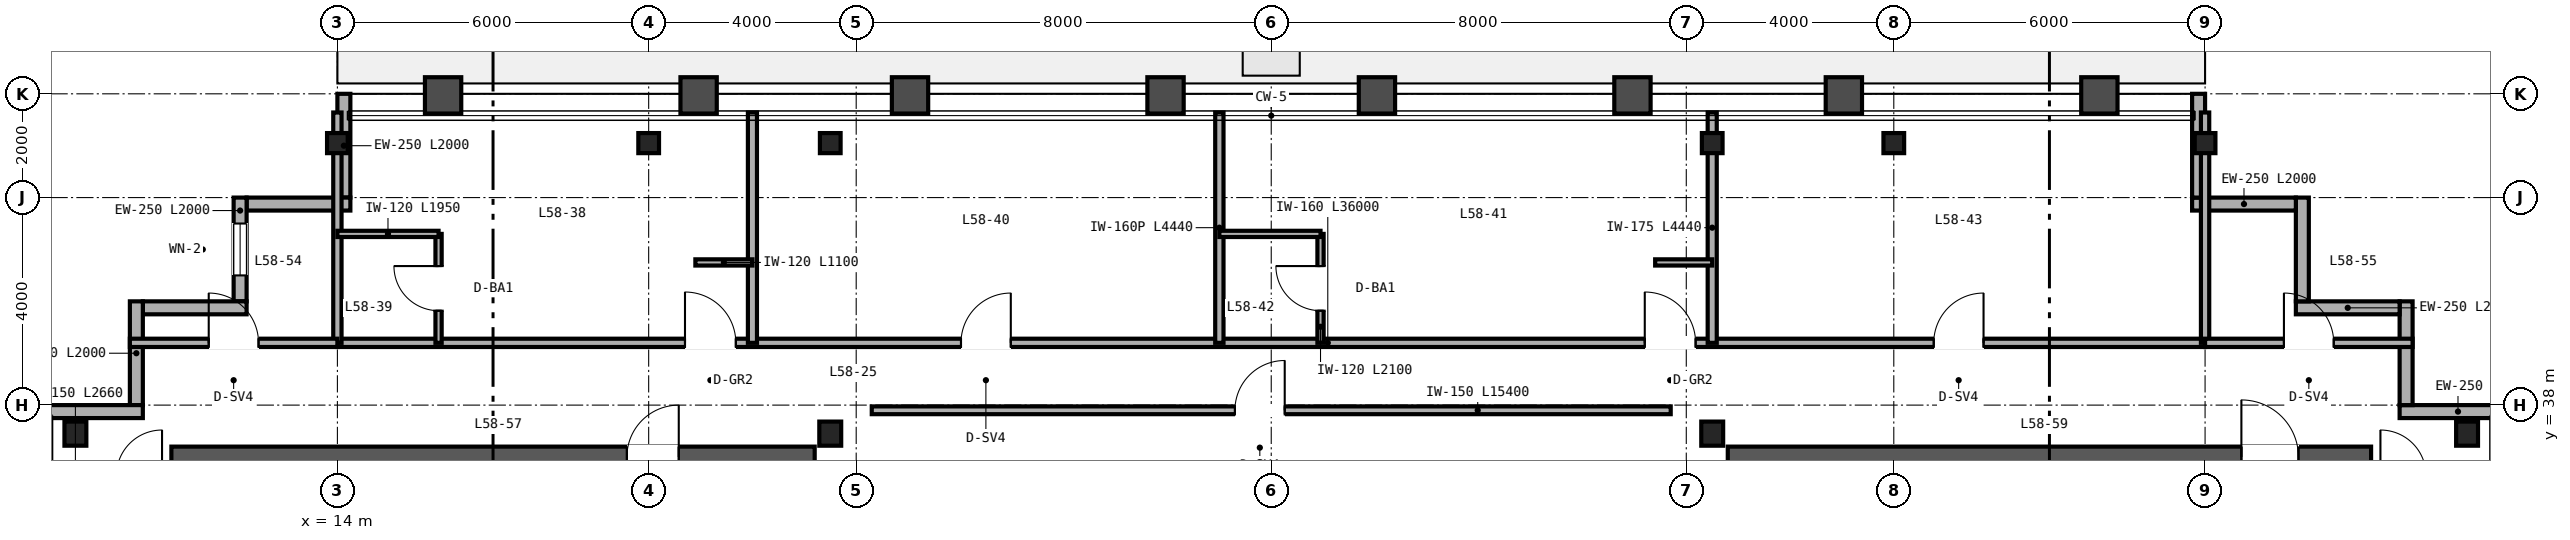
"""IFC4 building model, lengths in metres.
Left out: names, types, materials, properties, quantities, classifications, styles, units other than length and angle.
Written with IfcOpenShell. Run it as: python <this file> out.ifc"""

import sys

from ifc_helpers import new_model, si_unit, direction, frame, frame_2d, origin, origin_2d, place, context, subcontext, project, spatial, rectangle, i_section, extrude, source, transform, mapped, element, fill, save


model = new_model("IFC4")
c1 = context("Model", 3, precision=1e-05, world=origin(), true_north=direction((0.0, 1.0)))
c2 = subcontext(c1, "Body", "Model", "MODEL_VIEW")
j1 = project(units=[si_unit("LENGTHUNIT", "METRE"), si_unit("PLANEANGLEUNIT", "RADIAN")], contexts=[c1])
p1 = place(None, origin())
s1 = spatial("IfcSite", under=j1, at=p1, CompositionType="ELEMENT")
p2 = place(p1, origin())
s2 = spatial("IfcBuilding", under=s1, at=p2, CompositionType="ELEMENT")
p3 = place(p2, frame((0.0, 0.0, 232.8)))
s3 = spatial("IfcBuildingStorey", under=s2, at=p3, CompositionType="ELEMENT", Elevation=232.8)
p4 = place(p3, frame((10.8, 37.0, 0.0), z_axis=(0.0, 0.0, 1.0), x_axis=(1.0, 0.0, 0.0)))
e1 = element("IfcWall", 1, at=p4, inside=s3, PredefinedType="SHEAR", context=c2, shape_type="SweptSolid", body=[
    extrude(rectangle(XDim=12.4, YDim=0.4, at=frame_2d((6.2, 0.0))), origin(), (0.0, 0.0, 1.0), 3.38),
])
p5 = place(p4, frame((8.78, 0.0, 0.0)))
e2 = element("IfcOpeningElement", 2, at=p5, cuts=e1, PredefinedType="OPENING", context=c2, shape_type="SweptSolid", body=[
    extrude(rectangle(XDim=1.0, YDim=2.15, at=frame_2d((0.5, 1.075))), frame((0.0, 0.21, 0.0), z_axis=(0.0, -1.0, 0.0), x_axis=(1.0, 0.0, 0.0)), (0.0, 0.0, 1.0), 0.42),
])
p6 = place(p3, frame((40.8, 37.0, 0.0), z_axis=(0.0, 0.0, 1.0), x_axis=(1.0, 0.0, 0.0)))
e3 = element("IfcWall", 3, at=p6, inside=s3, PredefinedType="SHEAR", context=c2, shape_type="SweptSolid", body=[
    extrude(rectangle(XDim=12.4, YDim=0.4, at=frame_2d((6.2, 0.0))), origin(), (0.0, 0.0, 1.0), 3.38),
])
p7 = place(p6, frame((9.9, 0.0, 0.0)))
e4 = element("IfcOpeningElement", 4, at=p7, cuts=e3, PredefinedType="OPENING", context=c2, shape_type="SweptSolid", body=[
    extrude(rectangle(XDim=1.1, YDim=2.15, at=frame_2d((0.55, 1.075))), frame((0.0, 0.21, 0.0), z_axis=(0.0, -1.0, 0.0), x_axis=(1.0, 0.0, 0.0)), (0.0, 0.0, 1.0), 0.42),
])
m1 = source(origin(), c2, "Body", "SweptSolid", [
    extrude(i_section(OverallWidth=0.422, OverallDepth=0.465, WebThickness=0.045, FlangeThickness=0.073, FilletRadius=0.025, at=origin_2d()), origin(), (0.0, 0.0, 1.0), 3.38),
])
for number, where, z_axis, x_axis in (
    (5, (8.95, 37.45, 0.0), (0.0, 0.0, 1.0), (1.0, 0.0, 0.0)),
    (6, (23.5, 37.45, 0.0), (0.0, 0.0, 1.0), (1.0, 0.0, 0.0)),
    (7, (40.5, 37.45, 0.0), (0.0, 0.0, 1.0), (1.0, 0.0, 0.0)),
    (8, (55.05, 37.45, 0.0), (0.0, 0.0, 1.0), (1.0, 0.0, 0.0)),
):
    element("IfcColumn", number, at=place(p3, frame(where, z_axis=z_axis, x_axis=x_axis)), inside=s3, PredefinedType="COLUMN", context=c2, shape_type="MappedRepresentation", body=[
        mapped(m1, transform((0.0, 0.0, 0.0), scale=1.0)),
    ])
m2 = source(origin(), c2, "Body", "SweptSolid", [
    extrude(i_section(OverallWidth=0.399, OverallDepth=0.387, WebThickness=0.021, FlangeThickness=0.033, FilletRadius=0.025, at=origin_2d()), origin(), (0.0, 0.0, 1.0), 3.38),
])
for number, where, z_axis, x_axis in (
    (9, (14.0, 43.05, 0.0), (0.0, 0.0, 1.0), (1.0, 0.0, 0.0)),
    (10, (20.0, 43.05, 0.0), (0.0, 0.0, 1.0), (1.0, 0.0, 0.0)),
    (11, (23.5, 43.05, 0.0), (0.0, 0.0, 1.0), (1.0, 0.0, 0.0)),
    (12, (40.5, 43.05, 0.0), (0.0, 0.0, 1.0), (1.0, 0.0, 0.0)),
    (13, (44.0, 43.05, 0.0), (0.0, 0.0, 1.0), (1.0, 0.0, 0.0)),
    (14, (50.0, 43.05, 0.0), (0.0, 0.0, 1.0), (1.0, 0.0, 0.0)),
):
    element("IfcColumn", number, at=place(p3, frame(where, z_axis=z_axis, x_axis=x_axis)), inside=s3, PredefinedType="COLUMN", context=c2, shape_type="MappedRepresentation", body=[
        mapped(m2, transform((0.0, 0.0, 0.0), scale=1.0)),
    ])
p8 = place(p3, frame((56.0, 37.875, 0.0), z_axis=(0.0, 0.0, 1.0), x_axis=(-1.0, 0.0, 0.0)))
e15 = element("IfcWall", 15, at=p8, inside=s3, PredefinedType="SOLIDWALL", context=c2, shape_type="SweptSolid", body=[
    extrude(rectangle(XDim=2.25, YDim=0.25, at=frame_2d((1.125, 0.0))), origin(), (0.0, 0.0, 1.0), 3.38),
])
for number, where, z_axis, x_axis in (
    (16, (53.875, 38.0, 0.0), (0.0, 0.0, 1.0), (0.0, 1.0, 0.0)),
    (17, (53.75, 39.875, 0.0), (0.0, 0.0, 1.0), (-1.0, 0.0, 0.0)),
    (18, (51.875, 40.0, 0.0), (0.0, 0.0, 1.0), (0.0, 1.0, 0.0)),
    (19, (51.75, 41.875, 0.0), (0.0, 0.0, 1.0), (-1.0, 0.0, 0.0)),
):
    element("IfcWall", number, at=place(p3, frame(where, z_axis=z_axis, x_axis=x_axis)), inside=s3, PredefinedType="SOLIDWALL", context=c2, shape_type="SweptSolid", body=[
        extrude(rectangle(XDim=2.0, YDim=0.25, at=frame_2d((1.0, 0.0))), origin(), (0.0, 0.0, 1.0), 3.38),
    ])
for number, where, z_axis, x_axis in (
    (20, (49.875, 42.0, 0.0), (0.0, 0.0, 1.0), (0.0, 1.0, 0.0)),
    (21, (14.125, 44.0, 0.0), (0.0, 0.0, 1.0), (0.0, -1.0, 0.0)),
):
    element("IfcWall", number, at=place(p3, frame(where, z_axis=z_axis, x_axis=x_axis)), inside=s3, PredefinedType="SOLIDWALL", context=c2, shape_type="SweptSolid", body=[
        extrude(rectangle(XDim=2.0, YDim=0.25, at=frame_2d((1.0, 0.0))), origin(), (0.0, 0.0, 1.0), 2.687),
    ])
p9 = place(p3, frame((14.25, 41.875, 0.0), z_axis=(0.0, 0.0, 1.0), x_axis=(-1.0, 0.0, 0.0)))
e22 = element("IfcWall", 22, at=p9, inside=s3, PredefinedType="SOLIDWALL", context=c2, shape_type="SweptSolid", body=[
    extrude(rectangle(XDim=2.0, YDim=0.25, at=frame_2d((1.0, 0.0))), origin(), (0.0, 0.0, 1.0), 3.38),
])
p10 = place(p3, frame((12.125, 42.0, 0.0), z_axis=(0.0, 0.0, 1.0), x_axis=(0.0, -1.0, 0.0)))
e23 = element("IfcWall", 23, at=p10, inside=s3, PredefinedType="SOLIDWALL", context=c2, shape_type="SweptSolid", body=[
    extrude(rectangle(XDim=2.0, YDim=0.25, at=frame_2d((1.0, 0.0))), origin(), (0.0, 0.0, 1.0), 3.38),
])
p11 = place(p10, frame((0.5, 0.0, 0.85)))
e24 = element("IfcOpeningElement", 24, at=p11, cuts=e23, PredefinedType="OPENING", context=c2, shape_type="SweptSolid", body=[
    extrude(rectangle(XDim=1.0, YDim=1.9, at=frame_2d((0.5, 0.95))), frame((0.0, 0.135, 0.0), z_axis=(0.0, -1.0, 0.0), x_axis=(1.0, 0.0, 0.0)), (0.0, 0.0, 1.0), 0.27),
])
for number, where, z_axis, x_axis in (
    (25, (12.25, 39.875, 0.0), (0.0, 0.0, 1.0), (-1.0, 0.0, 0.0)),
    (26, (10.125, 40.0, 0.0), (0.0, 0.0, 1.0), (0.0, -1.0, 0.0)),
):
    element("IfcWall", number, at=place(p3, frame(where, z_axis=z_axis, x_axis=x_axis)), inside=s3, PredefinedType="SOLIDWALL", context=c2, shape_type="SweptSolid", body=[
        extrude(rectangle(XDim=2.0, YDim=0.25, at=frame_2d((1.0, 0.0))), origin(), (0.0, 0.0, 1.0), 3.38),
    ])
p12 = place(p3, frame((10.25, 37.875, 0.0), z_axis=(0.0, 0.0, 1.0), x_axis=(-1.0, 0.0, 0.0)))
e27 = element("IfcWall", 27, at=p12, inside=s3, PredefinedType="SOLIDWALL", context=c2, shape_type="SweptSolid", body=[
    extrude(rectangle(XDim=2.25, YDim=0.25, at=frame_2d((1.125, 0.0))), origin(), (0.0, 0.0, 1.0), 3.38),
])
p13 = place(p3, frame((24.3, 37.9, 0.0), z_axis=(0.0, 0.0, 1.0), x_axis=(1.0, 0.0, 0.0)))
e28 = element("IfcWall", 28, at=p13, inside=s3, PredefinedType="PARTITIONING", context=c2, shape_type="SweptSolid", body=[
    extrude(rectangle(XDim=15.4, YDim=0.15, at=frame_2d((7.7, 0.0))), origin(), (0.0, 0.0, 1.0), 3.38),
])
p14 = place(p13, frame((7.0, 0.0, 0.0)))
e29 = element("IfcOpeningElement", 29, at=p14, cuts=e28, PredefinedType="OPENING", context=c2, shape_type="SweptSolid", body=[
    extrude(rectangle(XDim=0.96, YDim=2.15, at=frame_2d((0.48, 1.075))), frame((0.0, 0.085, 0.0), z_axis=(0.0, -1.0, 0.0), x_axis=(1.0, 0.0, 0.0)), (0.0, 0.0, 1.0), 0.17),
])
p15 = place(p3, frame((14.0, 39.2, 0.0), z_axis=(0.0, 0.0, 1.0), x_axis=(1.0, 0.0, 0.0)))
e30 = element("IfcWall", 30, at=p15, inside=s3, PredefinedType="PARTITIONING", context=c2, shape_type="SweptSolid", body=[
    extrude(rectangle(XDim=36.0, YDim=0.16, at=frame_2d((18.0, 0.0))), origin(), (0.0, 0.0, 1.0), 2.923),
])
p16 = place(p15, frame((6.7, 0.0, 0.0)))
e31 = element("IfcOpeningElement", 31, at=p16, cuts=e30, PredefinedType="OPENING", context=c2, shape_type="SweptSolid", body=[
    extrude(rectangle(XDim=0.98, YDim=2.2, at=frame_2d((0.49, 1.1))), frame((0.0, 0.09, 0.0), z_axis=(0.0, -1.0, 0.0), x_axis=(1.0, 0.0, 0.0)), (0.0, 0.0, 1.0), 0.18),
])
p17 = place(p15, frame((12.02, 0.0, 0.0)))
e32 = element("IfcOpeningElement", 32, at=p17, cuts=e30, PredefinedType="OPENING", context=c2, shape_type="SweptSolid", body=[
    extrude(rectangle(XDim=0.96, YDim=2.15, at=frame_2d((0.48, 1.075))), frame((0.0, 0.09, 0.0), z_axis=(0.0, -1.0, 0.0), x_axis=(1.0, 0.0, 0.0)), (0.0, 0.0, 1.0), 0.18),
])
p18 = place(p15, frame((25.2, 0.0, 0.0)))
e33 = element("IfcOpeningElement", 33, at=p18, cuts=e30, PredefinedType="OPENING", context=c2, shape_type="SweptSolid", body=[
    extrude(rectangle(XDim=0.98, YDim=2.2, at=frame_2d((0.49, 1.1))), frame((0.0, 0.09, 0.0), z_axis=(0.0, -1.0, 0.0), x_axis=(1.0, 0.0, 0.0)), (0.0, 0.0, 1.0), 0.18),
])
p19 = place(p15, frame((30.77, 0.0, 0.0)))
e34 = element("IfcOpeningElement", 34, at=p19, cuts=e30, PredefinedType="OPENING", context=c2, shape_type="SweptSolid", body=[
    extrude(rectangle(XDim=0.96, YDim=2.15, at=frame_2d((0.48, 1.075))), frame((0.0, 0.09, 0.0), z_axis=(0.0, -1.0, 0.0), x_axis=(1.0, 0.0, 0.0)), (0.0, 0.0, 1.0), 0.18),
])
for number, where, z_axis, x_axis in (
    (35, (14.0, 39.2, 0.0), (0.0, 0.0, 1.0), (0.0, 1.0, 0.0)),
    (36, (50.0, 39.2, 0.0), (0.0, 0.0, 1.0), (0.0, 1.0, 0.0)),
):
    element("IfcWall", number, at=place(p3, frame(where, z_axis=z_axis, x_axis=x_axis)), inside=s3, PredefinedType="PARTITIONING", context=c2, shape_type="SweptSolid", body=[
        extrude(rectangle(XDim=4.44, YDim=0.16, at=frame_2d((2.22, 0.0))), origin(), (0.0, 0.0, 1.0), 2.687),
    ])
p20 = place(p3, frame((22.0, 39.2, 0.0), z_axis=(0.0, 0.0, 1.0), x_axis=(0.0, 1.0, 0.0)))
e37 = element("IfcWall", 37, at=p20, inside=s3, PredefinedType="PARTITIONING", context=c2, shape_type="SweptSolid", body=[
    extrude(rectangle(XDim=4.44, YDim=0.175, at=frame_2d((2.22, 0.0))), origin(), (0.0, 0.0, 1.0), 2.843),
])
p21 = place(p3, frame((15.95, 39.2, 0.0), z_axis=(0.0, 0.0, 1.0), x_axis=(0.0, 1.0, 0.0)))
e38 = element("IfcWall", 38, at=p21, inside=s3, PredefinedType="PARTITIONING", context=c2, shape_type="SweptSolid", body=[
    extrude(rectangle(XDim=2.1, YDim=0.12, at=frame_2d((1.05, 0.0))), origin(), (0.0, 0.0, 1.0), 3.38),
])
p22 = place(p21, frame((0.62, 0.0, 0.0)))
e39 = element("IfcOpeningElement", 39, at=p22, cuts=e38, PredefinedType="OPENING", context=c2, shape_type="SweptSolid", body=[
    extrude(rectangle(XDim=0.86, YDim=2.1, at=frame_2d((0.43, 1.05))), frame((0.0, 0.07, 0.0), z_axis=(0.0, -1.0, 0.0), x_axis=(1.0, 0.0, 0.0)), (0.0, 0.0, 1.0), 0.14),
])
p23 = place(p3, frame((14.0, 41.3, 0.0), z_axis=(0.0, 0.0, 1.0), x_axis=(1.0, 0.0, 0.0)))
e40 = element("IfcWall", 40, at=p23, inside=s3, PredefinedType="PARTITIONING", context=c2, shape_type="SweptSolid", body=[
    extrude(rectangle(XDim=1.95, YDim=0.12, at=frame_2d((0.975, 0.0))), origin(), (0.0, 0.0, 1.0), 3.38),
])
p24 = place(p3, frame((20.9, 40.75, 0.0), z_axis=(0.0, 0.0, 1.0), x_axis=(1.0, 0.0, 0.0)))
e41 = element("IfcWall", 41, at=p24, inside=s3, PredefinedType="PARTITIONING", context=c2, shape_type="SweptSolid", body=[
    extrude(rectangle(XDim=1.1, YDim=0.12, at=frame_2d((0.55, 0.0))), origin(), (0.0, 0.0, 1.0), 3.38),
])
p25 = place(p3, frame((31.0, 39.2, 0.0), z_axis=(0.0, 0.0, 1.0), x_axis=(0.0, 1.0, 0.0)))
e42 = element("IfcWall", 42, at=p25, inside=s3, PredefinedType="PARTITIONING", context=c2, shape_type="SweptSolid", body=[
    extrude(rectangle(XDim=4.44, YDim=0.16, at=frame_2d((2.22, 0.0))), origin(), (0.0, 0.0, 1.0), 2.453),
])
p26 = place(p3, frame((40.5, 39.2, 0.0), z_axis=(0.0, 0.0, 1.0), x_axis=(0.0, 1.0, 0.0)))
e43 = element("IfcWall", 43, at=p26, inside=s3, PredefinedType="PARTITIONING", context=c2, shape_type="SweptSolid", body=[
    extrude(rectangle(XDim=4.44, YDim=0.175, at=frame_2d((2.22, 0.0))), origin(), (0.0, 0.0, 1.0), 2.453),
])
p27 = place(p3, frame((32.95, 39.2, 0.0), z_axis=(0.0, 0.0, 1.0), x_axis=(0.0, 1.0, 0.0)))
e44 = element("IfcWall", 44, at=p27, inside=s3, PredefinedType="PARTITIONING", context=c2, shape_type="SweptSolid", body=[
    extrude(rectangle(XDim=2.1, YDim=0.12, at=frame_2d((1.05, 0.0))), origin(), (0.0, 0.0, 1.0), 3.38),
])
p28 = place(p27, frame((0.62, 0.0, 0.0)))
e45 = element("IfcOpeningElement", 45, at=p28, cuts=e44, PredefinedType="OPENING", context=c2, shape_type="SweptSolid", body=[
    extrude(rectangle(XDim=0.86, YDim=2.1, at=frame_2d((0.43, 1.05))), frame((0.0, 0.07, 0.0), z_axis=(0.0, -1.0, 0.0), x_axis=(1.0, 0.0, 0.0)), (0.0, 0.0, 1.0), 0.14),
])
p29 = place(p3, frame((31.0, 41.3, 0.0), z_axis=(0.0, 0.0, 1.0), x_axis=(1.0, 0.0, 0.0)))
e46 = element("IfcWall", 46, at=p29, inside=s3, PredefinedType="PARTITIONING", context=c2, shape_type="SweptSolid", body=[
    extrude(rectangle(XDim=1.95, YDim=0.12, at=frame_2d((0.975, 0.0))), origin(), (0.0, 0.0, 1.0), 3.38),
])
p30 = place(p3, frame((39.4, 40.75, 0.0), z_axis=(0.0, 0.0, 1.0), x_axis=(1.0, 0.0, 0.0)))
e47 = element("IfcWall", 47, at=p30, inside=s3, PredefinedType="PARTITIONING", context=c2, shape_type="SweptSolid", body=[
    extrude(rectangle(XDim=1.1, YDim=0.12, at=frame_2d((0.55, 0.0))), origin(), (0.0, 0.0, 1.0), 2.923),
])
p31 = place(p3, frame((10.0, 39.2, 0.0), z_axis=(0.0, 0.0, 1.0), x_axis=(1.0, 0.0, 0.0)))
e48 = element("IfcWall", 48, at=p31, inside=s3, PredefinedType="PARTITIONING", context=c2, shape_type="SweptSolid", body=[
    extrude(rectangle(XDim=4.0, YDim=0.16, at=frame_2d((2.0, 0.0))), origin(), (0.0, 0.0, 1.0), 3.38),
])
p32 = place(p31, frame((1.52, 0.0, 0.0)))
e49 = element("IfcOpeningElement", 49, at=p32, cuts=e48, PredefinedType="OPENING", context=c2, shape_type="SweptSolid", body=[
    extrude(rectangle(XDim=0.96, YDim=2.15, at=frame_2d((0.48, 1.075))), frame((0.0, 0.09, 0.0), z_axis=(0.0, -1.0, 0.0), x_axis=(1.0, 0.0, 0.0)), (0.0, 0.0, 1.0), 0.18),
])
p33 = place(p3, frame((50.0, 39.2, 0.0), z_axis=(0.0, 0.0, 1.0), x_axis=(1.0, 0.0, 0.0)))
e50 = element("IfcWall", 50, at=p33, inside=s3, PredefinedType="PARTITIONING", context=c2, shape_type="SweptSolid", body=[
    extrude(rectangle(XDim=4.0, YDim=0.16, at=frame_2d((2.0, 0.0))), origin(), (0.0, 0.0, 1.0), 3.38),
])
p34 = place(p33, frame((1.52, 0.0, 0.0)))
e51 = element("IfcOpeningElement", 51, at=p34, cuts=e50, PredefinedType="OPENING", context=c2, shape_type="SweptSolid", body=[
    extrude(rectangle(XDim=0.96, YDim=2.15, at=frame_2d((0.48, 1.075))), frame((0.0, 0.09, 0.0), z_axis=(0.0, -1.0, 0.0), x_axis=(1.0, 0.0, 0.0)), (0.0, 0.0, 1.0), 0.18),
])
m3 = source(origin(), c2, "Body", "SweptSolid", [
    extrude(rectangle(XDim=1.0, YDim=1.9, at=frame_2d((0.5, 0.95))), frame((0.0, 0.03, 0.0), z_axis=(0.0, -1.0, 0.0), x_axis=(1.0, 0.0, 0.0)), (0.0, 0.0, 1.0), 0.06),
])
p35 = place(p11, origin())
e52 = element("IfcWindow", 52, at=p35, inside=s3, PartitioningType="SINGLE_PANEL", PredefinedType="WINDOW", context=c2, shape_type="MappedRepresentation", body=[
    mapped(m3, transform((0.0, 0.0, 0.0), scale=1.0)),
])
fill(e24, e52)
p36 = place(p3, frame((0.0, 0.0, -0.22)))
p37 = place(p36, frame((32.0, 44.9, 0.0)))
p38 = place(p37, frame((0.0, 0.0, 0.17)))
e53 = element("IfcDoor", 53, at=p38, inside=s3, OperationType="SINGLE_SWING_LEFT", PredefinedType="TRAPDOOR", context=c2, shape_type="SweptSolid", body=[
    extrude(rectangle(XDim=1.1, YDim=1.1, at=origin_2d()), origin(), (0.0, 0.0, 1.0), 0.05),
])
m4 = source(origin(), c2, "Body", "SweptSolid", [
    extrude(rectangle(XDim=1.0, YDim=2.15, at=frame_2d((0.5, 1.075))), frame((0.0, 0.025, 0.0), z_axis=(0.0, -1.0, 0.0), x_axis=(1.0, 0.0, 0.0)), (0.0, 0.0, 1.0), 0.05),
])
p39 = place(p5, origin())
e54 = element("IfcDoor", 54, at=p39, inside=s3, OperationType="SINGLE_SWING_RIGHT", PredefinedType="DOOR", context=c2, shape_type="MappedRepresentation", body=[
    mapped(m4, transform((0.0, 0.0, 0.0), scale=1.0)),
])
fill(e2, e54)
m5 = source(origin(), c2, "Body", "SweptSolid", [
    extrude(rectangle(XDim=1.1, YDim=2.15, at=frame_2d((0.55, 1.075))), frame((0.0, 0.025, 0.0), z_axis=(0.0, -1.0, 0.0), x_axis=(1.0, 0.0, 0.0)), (0.0, 0.0, 1.0), 0.05),
])
p40 = place(p7, origin())
e55 = element("IfcDoor", 55, at=p40, inside=s3, OperationType="SINGLE_SWING_LEFT", PredefinedType="DOOR", context=c2, shape_type="MappedRepresentation", body=[
    mapped(m5, transform((0.0, 0.0, 0.0), scale=1.0)),
])
fill(e4, e55)
m6 = source(origin(), c2, "Body", "SweptSolid", [
    extrude(rectangle(XDim=0.96, YDim=2.15, at=frame_2d((0.48, 1.075))), frame((0.0, 0.025, 0.0), z_axis=(0.0, -1.0, 0.0), x_axis=(1.0, 0.0, 0.0)), (0.0, 0.0, 1.0), 0.05),
])
p41 = place(p14, origin())
e56 = element("IfcDoor", 56, at=p41, inside=s3, OperationType="SINGLE_SWING_RIGHT", PredefinedType="DOOR", context=c2, shape_type="MappedRepresentation", body=[
    mapped(m6, transform((0.0, 0.0, 0.0), scale=1.0)),
])
fill(e29, e56)
m7 = source(origin(), c2, "Body", "SweptSolid", [
    extrude(rectangle(XDim=0.86, YDim=2.1, at=frame_2d((0.43, 1.05))), frame((0.0, 0.025, 0.0), z_axis=(0.0, -1.0, 0.0), x_axis=(1.0, 0.0, 0.0)), (0.0, 0.0, 1.0), 0.05),
])
p42 = place(p22, origin())
e57 = element("IfcDoor", 57, at=p42, inside=s3, OperationType="SINGLE_SWING_RIGHT", PredefinedType="DOOR", context=c2, shape_type="MappedRepresentation", body=[
    mapped(m7, transform((0.0, 0.0, 0.0), scale=1.0)),
])
fill(e39, e57)
p43 = place(p28, origin())
e58 = element("IfcDoor", 58, at=p43, inside=s3, OperationType="SINGLE_SWING_RIGHT", PredefinedType="DOOR", context=c2, shape_type="MappedRepresentation", body=[
    mapped(m7, transform((0.0, 0.0, 0.0), scale=1.0)),
])
fill(e45, e58)
m8 = source(origin(), c2, "Body", "SweptSolid", [
    extrude(rectangle(XDim=0.98, YDim=2.2, at=frame_2d((0.49, 1.1))), frame((0.0, 0.025, 0.0), z_axis=(0.0, -1.0, 0.0), x_axis=(1.0, 0.0, 0.0)), (0.0, 0.0, 1.0), 0.05),
])
p44 = place(p16, origin())
e59 = element("IfcDoor", 59, at=p44, inside=s3, OperationType="SINGLE_SWING_LEFT", PredefinedType="DOOR", context=c2, shape_type="MappedRepresentation", body=[
    mapped(m8, transform((0.0, 0.0, 0.0), scale=1.0)),
])
fill(e31, e59)
p45 = place(p17, origin())
e60 = element("IfcDoor", 60, at=p45, inside=s3, OperationType="SINGLE_SWING_RIGHT", PredefinedType="DOOR", context=c2, shape_type="MappedRepresentation", body=[
    mapped(m6, transform((0.0, 0.0, 0.0), scale=1.0)),
])
fill(e32, e60)
p46 = place(p18, origin())
e61 = element("IfcDoor", 61, at=p46, inside=s3, OperationType="SINGLE_SWING_LEFT", PredefinedType="DOOR", context=c2, shape_type="MappedRepresentation", body=[
    mapped(m8, transform((0.0, 0.0, 0.0), scale=1.0)),
])
fill(e33, e61)
p47 = place(p19, origin())
e62 = element("IfcDoor", 62, at=p47, inside=s3, OperationType="SINGLE_SWING_RIGHT", PredefinedType="DOOR", context=c2, shape_type="MappedRepresentation", body=[
    mapped(m6, transform((0.0, 0.0, 0.0), scale=1.0)),
])
fill(e34, e62)
p48 = place(p32, origin())
e63 = element("IfcDoor", 63, at=p48, inside=s3, OperationType="SINGLE_SWING_LEFT", PredefinedType="DOOR", context=c2, shape_type="MappedRepresentation", body=[
    mapped(m6, transform((0.0, 0.0, 0.0), scale=1.0)),
])
fill(e49, e63)
p49 = place(p34, origin())
e64 = element("IfcDoor", 64, at=p49, inside=s3, OperationType="SINGLE_SWING_LEFT", PredefinedType="DOOR", context=c2, shape_type="MappedRepresentation", body=[
    mapped(m6, transform((0.0, 0.0, 0.0), scale=1.0)),
])
fill(e51, e64)
save(model, sys.argv[1])
